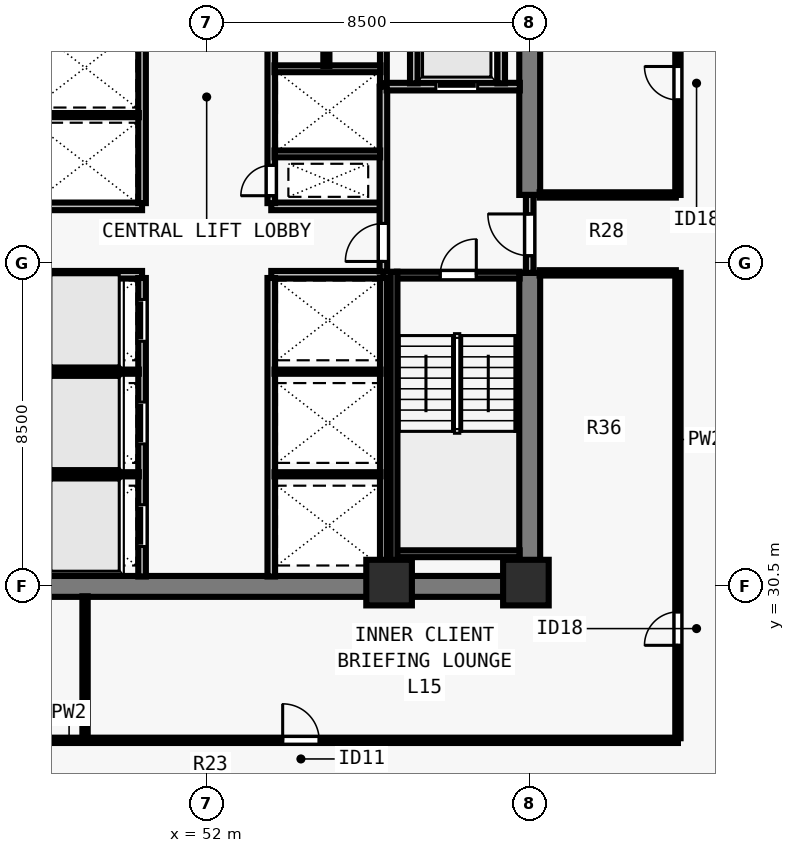
"""IFC4 building model, lengths in metres.
Left out: names, types, materials, properties, quantities, classifications, styles, units other than length and angle.
Written with IfcOpenShell. Run it as: python <this file> out.ifc"""

import sys

from ifc_helpers import new_model, si_unit, direction, frame, frame_2d, origin, origin_2d, place, context, subcontext, project, spatial, rectangle, extrude, element, fill, save


model = new_model("IFC4")
c1 = context("Model", 3, precision=1e-05, world=origin(), true_north=direction((0.0, 1.0)))
c2 = subcontext(c1, "Body", "Model", "MODEL_VIEW")
j1 = project(units=[si_unit("LENGTHUNIT", "METRE"), si_unit("PLANEANGLEUNIT", "RADIAN")], contexts=[c1])
p1 = place(None, origin())
s1 = spatial("IfcSite", under=j1, at=p1, CompositionType="ELEMENT")
p2 = place(p1, origin())
s2 = spatial("IfcBuilding", under=s1, at=p2, CompositionType="ELEMENT")
p3 = place(p2, frame((0.0, 0.0, 58.5)))
s3 = spatial("IfcBuildingStorey", under=s2, at=p3, CompositionType="ELEMENT", Elevation=58.5)
for number, where, z_axis, x_axis in (
    (1, (56.8, 30.6, 0.0), (0.0, 0.0, 1.0), (1.0, 0.0, 0.0)),
    (2, (60.4, 30.6, 0.0), (0.0, 0.0, 1.0), (1.0, 0.0, 0.0)),
):
    element("IfcColumn", number, at=place(p3, frame(where, z_axis=z_axis, x_axis=x_axis)), inside=s3, PredefinedType="COLUMN", context=c2, shape_type="SweptSolid", body=[
        extrude(rectangle(XDim=1.2, YDim=1.2, at=origin_2d()), origin(), (0.0, 0.0, 1.0), 3.5),
    ])
p4 = place(p3, frame((43.225, 30.5, 0.0), z_axis=(0.0, 0.0, 1.0), x_axis=(1.0, 0.0, 0.0)))
e3 = element("IfcWall", 3, at=p4, inside=s3, PredefinedType="SHEAR", context=c2, shape_type="SweptSolid", body=[
    extrude(rectangle(XDim=17.55, YDim=0.55, at=frame_2d((8.775, 0.0))), origin(), (0.0, 0.0, 1.0), 3.28),
])
p5 = place(p3, frame((60.5, 30.765, 0.0), z_axis=(0.0, 0.0, 1.0), x_axis=(0.0, 1.0, 0.0)))
e4 = element("IfcWall", 4, at=p5, inside=s3, PredefinedType="SHEAR", context=c2, shape_type="SweptSolid", body=[
    extrude(rectangle(XDim=7.985, YDim=0.55, at=frame_2d((3.993, 0.0))), origin(), (0.0, 0.0, 1.0), 3.28),
])
p6 = place(p3, frame((60.5, 40.8, 0.0), z_axis=(0.0, 0.0, 1.0), x_axis=(0.0, 1.0, 0.0)))
e5 = element("IfcWall", 5, at=p6, inside=s3, PredefinedType="SHEAR", context=c2, shape_type="SweptSolid", body=[
    extrude(rectangle(XDim=6.435, YDim=0.55, at=frame_2d((3.218, 0.0))), origin(), (0.0, 0.0, 1.0), 3.28),
])
for number, where, z_axis, x_axis in (
    (6, (47.35, 38.7, 0.0), (0.0, 0.0, 1.0), (1.0, 0.0, 0.0)),
    (7, (47.35, 40.5, 0.0), (0.0, 0.0, 1.0), (1.0, 0.0, 0.0)),
    (8, (53.7, 38.7, 0.0), (0.0, 0.0, 1.0), (1.0, 0.0, 0.0)),
    (9, (53.7, 40.5, 0.0), (0.0, 0.0, 1.0), (1.0, 0.0, 0.0)),
):
    element("IfcWall", number, at=place(p3, frame(where, z_axis=z_axis, x_axis=x_axis)), inside=s3, PredefinedType="SOLIDWALL", context=c2, shape_type="SweptSolid", body=[
        extrude(rectangle(XDim=2.95, YDim=0.2, at=frame_2d((1.475, 0.0))), origin(), (0.0, 0.0, 1.0), 3.28),
    ])
p7 = place(p3, frame((50.3, 30.76, 0.0), z_axis=(0.0, 0.0, 1.0), x_axis=(0.0, 1.0, 0.0)))
e10 = element("IfcWall", 10, at=p7, inside=s3, PredefinedType="SOLIDWALL", context=c2, shape_type="SweptSolid", body=[
    extrude(rectangle(XDim=7.855, YDim=0.2, at=frame_2d((3.927, 0.0))), origin(), (0.0, 0.0, 1.0), 3.28),
])
p8 = place(p7, frame((0.79, 0.0, 0.0)))
e11 = element("IfcOpeningElement", 11, at=p8, cuts=e10, PredefinedType="OPENING", context=c2, shape_type="SweptSolid", body=[
    extrude(rectangle(XDim=1.1, YDim=2.2, at=frame_2d((0.55, 1.1))), frame((0.0, 0.11, 0.0), z_axis=(0.0, -1.0, 0.0), x_axis=(1.0, 0.0, 0.0)), (0.0, 0.0, 1.0), 0.22),
])
p9 = place(p7, frame((3.49, 0.0, 0.0)))
e12 = element("IfcOpeningElement", 12, at=p9, cuts=e10, PredefinedType="OPENING", context=c2, shape_type="SweptSolid", body=[
    extrude(rectangle(XDim=1.1, YDim=2.2, at=frame_2d((0.55, 1.1))), frame((0.0, 0.11, 0.0), z_axis=(0.0, -1.0, 0.0), x_axis=(1.0, 0.0, 0.0)), (0.0, 0.0, 1.0), 0.22),
])
p10 = place(p7, frame((6.19, 0.0, 0.0)))
e13 = element("IfcOpeningElement", 13, at=p10, cuts=e10, PredefinedType="OPENING", context=c2, shape_type="SweptSolid", body=[
    extrude(rectangle(XDim=1.1, YDim=2.2, at=frame_2d((0.55, 1.1))), frame((0.0, 0.11, 0.0), z_axis=(0.0, -1.0, 0.0), x_axis=(1.0, 0.0, 0.0)), (0.0, 0.0, 1.0), 0.22),
])
p11 = place(p3, frame((53.7, 30.76, 0.0), z_axis=(0.0, 0.0, 1.0), x_axis=(0.0, 1.0, 0.0)))
e14 = element("IfcWall", 14, at=p11, inside=s3, PredefinedType="SOLIDWALL", context=c2, shape_type="SweptSolid", body=[
    extrude(rectangle(XDim=7.855, YDim=0.2, at=frame_2d((3.927, 0.0))), origin(), (0.0, 0.0, 1.0), 3.28),
])
p12 = place(p3, frame((50.3, 40.585, 0.0), z_axis=(0.0, 0.0, 1.0), x_axis=(0.0, 1.0, 0.0)))
e15 = element("IfcWall", 15, at=p12, inside=s3, PredefinedType="SOLIDWALL", context=c2, shape_type="SweptSolid", body=[
    extrude(rectangle(XDim=6.655, YDim=0.2, at=frame_2d((3.328, 0.0))), origin(), (0.0, 0.0, 1.0), 3.28),
])
p13 = place(p12, frame((5.065, 0.0, 0.0)))
e16 = element("IfcOpeningElement", 16, at=p13, cuts=e15, PredefinedType="OPENING", context=c2, shape_type="SweptSolid", body=[
    extrude(rectangle(XDim=0.8, YDim=2.08, at=frame_2d((0.4, 1.04))), frame((0.0, 0.11, 0.0), z_axis=(0.0, -1.0, 0.0), x_axis=(1.0, 0.0, 0.0)), (0.0, 0.0, 1.0), 0.22),
])
p14 = place(p3, frame((53.7, 40.585, 0.0), z_axis=(0.0, 0.0, 1.0), x_axis=(0.0, 1.0, 0.0)))
e17 = element("IfcWall", 17, at=p14, inside=s3, PredefinedType="SOLIDWALL", context=c2, shape_type="SweptSolid", body=[
    extrude(rectangle(XDim=6.655, YDim=0.2, at=frame_2d((3.328, 0.0))), origin(), (0.0, 0.0, 1.0), 3.28),
])
p15 = place(p14, frame((0.195, 0.0, 0.0)))
e18 = element("IfcOpeningElement", 18, at=p15, cuts=e17, PredefinedType="OPENING", context=c2, shape_type="SweptSolid", body=[
    extrude(rectangle(XDim=0.8, YDim=2.08, at=frame_2d((0.4, 1.04))), frame((0.0, 0.11, 0.0), z_axis=(0.0, -1.0, 0.0), x_axis=(1.0, 0.0, 0.0)), (0.0, 0.0, 1.0), 0.22),
])
p16 = place(p14, frame((4.265, 0.0, 0.0)))
e19 = element("IfcOpeningElement", 19, at=p16, cuts=e17, PredefinedType="OPENING", context=c2, shape_type="SweptSolid", body=[
    extrude(rectangle(XDim=0.95, YDim=2.12, at=frame_2d((0.475, 1.06))), frame((0.0, 0.11, 0.0), z_axis=(0.0, -1.0, 0.0), x_axis=(1.0, 0.0, 0.0)), (0.0, 0.0, 1.0), 0.22),
])
p17 = place(p3, frame((60.5, 38.75, 0.0), z_axis=(0.0, 0.0, 1.0), x_axis=(0.0, 1.0, 0.0)))
e20 = element("IfcWall", 20, at=p17, inside=s3, PredefinedType="SOLIDWALL", context=c2, shape_type="SweptSolid", body=[
    extrude(rectangle(XDim=2.05, YDim=0.2, at=frame_2d((1.025, 0.0))), origin(), (0.0, 0.0, 1.0), 3.28),
])
p18 = place(p17, frame((0.45, 0.0, 0.0)))
e21 = element("IfcOpeningElement", 21, at=p18, cuts=e20, PredefinedType="OPENING", context=c2, shape_type="SweptSolid", body=[
    extrude(rectangle(XDim=1.1, YDim=2.15, at=frame_2d((0.55, 1.075))), frame((0.0, 0.11, 0.0), z_axis=(0.0, -1.0, 0.0), x_axis=(1.0, 0.0, 0.0)), (0.0, 0.0, 1.0), 0.22),
])
p19 = place(p3, frame((56.65, 38.785, 0.0), z_axis=(0.0, 0.0, 1.0), x_axis=(0.0, 1.0, 0.0)))
e22 = element("IfcWall", 22, at=p19, inside=s3, PredefinedType="SOLIDWALL", context=c2, shape_type="SweptSolid", body=[
    extrude(rectangle(XDim=4.865, YDim=0.2, at=frame_2d((2.433, 0.0))), origin(), (0.0, 0.0, 1.0), 3.28),
])
p20 = place(p19, frame((0.265, 0.0, 0.0)))
e23 = element("IfcOpeningElement", 23, at=p20, cuts=e22, PredefinedType="OPENING", context=c2, shape_type="SweptSolid", body=[
    extrude(rectangle(XDim=1.0, YDim=2.15, at=frame_2d((0.5, 1.075))), frame((0.0, 0.11, 0.0), z_axis=(0.0, -1.0, 0.0), x_axis=(1.0, 0.0, 0.0)), (0.0, 0.0, 1.0), 0.22),
])
p21 = place(p3, frame((56.735, 43.65, 0.0), z_axis=(0.0, 0.0, 1.0), x_axis=(1.0, 0.0, 0.0)))
e24 = element("IfcWall", 24, at=p21, inside=s3, PredefinedType="SOLIDWALL", context=c2, shape_type="SweptSolid", body=[
    extrude(rectangle(XDim=3.505, YDim=0.2, at=frame_2d((1.752, 0.0))), origin(), (0.0, 0.0, 1.0), 3.28),
])
p22 = place(p21, frame((1.295, 0.0, 0.0)))
e25 = element("IfcOpeningElement", 25, at=p22, cuts=e24, PredefinedType="OPENING", context=c2, shape_type="SweptSolid", body=[
    extrude(rectangle(XDim=1.1, YDim=2.2, at=frame_2d((0.55, 1.1))), frame((0.0, 0.11, 0.0), z_axis=(0.0, -1.0, 0.0), x_axis=(1.0, 0.0, 0.0)), (0.0, 0.0, 1.0), 0.22),
])
for number, where, z_axis, x_axis in (
    (26, (57.45, 43.735, 0.0), (0.0, 0.0, 1.0), (0.0, 1.0, 0.0)),
    (27, (59.75, 43.735, 0.0), (0.0, 0.0, 1.0), (0.0, 1.0, 0.0)),
):
    element("IfcWall", number, at=place(p3, frame(where, z_axis=z_axis, x_axis=x_axis)), inside=s3, PredefinedType="SOLIDWALL", context=c2, shape_type="SweptSolid", body=[
        extrude(rectangle(XDim=3.505, YDim=0.2, at=frame_2d((1.752, 0.0))), origin(), (0.0, 0.0, 1.0), 3.28),
    ])
for number, where, z_axis, x_axis in (
    (28, (47.425, 33.45, 0.0), (0.0, 0.0, 1.0), (1.0, 0.0, 0.0)),
    (29, (47.425, 36.15, 0.0), (0.0, 0.0, 1.0), (1.0, 0.0, 0.0)),
):
    element("IfcWall", number, at=place(p3, frame(where, z_axis=z_axis, x_axis=x_axis)), inside=s3, PredefinedType="PARTITIONING", context=c2, shape_type="SweptSolid", body=[
        extrude(rectangle(XDim=2.79, YDim=0.11, at=frame_2d((1.395, 0.0))), origin(), (0.0, 0.0, 1.0), 3.28),
    ])
p23 = place(p3, frame((56.65, 30.76, 0.0), z_axis=(0.0, 0.0, 1.0), x_axis=(0.0, 1.0, 0.0)))
e30 = element("IfcWall", 30, at=p23, inside=s3, PredefinedType="SOLIDWALL", context=c2, shape_type="SweptSolid", body=[
    extrude(rectangle(XDim=7.855, YDim=0.18, at=frame_2d((3.927, 0.0))), origin(), (0.0, 0.0, 1.0), 3.28),
])
for number, where, z_axis, x_axis in (
    (31, (53.785, 33.45, 0.0), (0.0, 0.0, 1.0), (1.0, 0.0, 0.0)),
    (32, (53.785, 36.15, 0.0), (0.0, 0.0, 1.0), (1.0, 0.0, 0.0)),
):
    element("IfcWall", number, at=place(p3, frame(where, z_axis=z_axis, x_axis=x_axis)), inside=s3, PredefinedType="PARTITIONING", context=c2, shape_type="SweptSolid", body=[
        extrude(rectangle(XDim=2.79, YDim=0.11, at=frame_2d((1.395, 0.0))), origin(), (0.0, 0.0, 1.0), 3.28),
    ])
p24 = place(p3, frame((47.435, 42.9, 0.0), z_axis=(0.0, 0.0, 1.0), x_axis=(1.0, 0.0, 0.0)))
e33 = element("IfcWall", 33, at=p24, inside=s3, PredefinedType="PARTITIONING", context=c2, shape_type="SweptSolid", body=[
    extrude(rectangle(XDim=2.78, YDim=0.11, at=frame_2d((1.39, 0.0))), origin(), (0.0, 0.0, 1.0), 3.28),
])
p25 = place(p3, frame((56.65, 43.735, 0.0), z_axis=(0.0, 0.0, 1.0), x_axis=(0.0, 1.0, 0.0)))
e34 = element("IfcWall", 34, at=p25, inside=s3, PredefinedType="SOLIDWALL", context=c2, shape_type="SweptSolid", body=[
    extrude(rectangle(XDim=3.505, YDim=0.18, at=frame_2d((1.752, 0.0))), origin(), (0.0, 0.0, 1.0), 3.28),
])
p26 = place(p3, frame((53.785, 41.88, 0.0), z_axis=(0.0, 0.0, 1.0), x_axis=(1.0, 0.0, 0.0)))
e35 = element("IfcWall", 35, at=p26, inside=s3, PredefinedType="SOLIDWALL", context=c2, shape_type="SweptSolid", body=[
    extrude(rectangle(XDim=2.78, YDim=0.18, at=frame_2d((1.39, 0.0))), origin(), (0.0, 0.0, 1.0), 3.28),
])
p27 = place(p3, frame((53.785, 44.12, 0.0), z_axis=(0.0, 0.0, 1.0), x_axis=(1.0, 0.0, 0.0)))
e36 = element("IfcWall", 36, at=p27, inside=s3, PredefinedType="SOLIDWALL", context=c2, shape_type="SweptSolid", body=[
    extrude(rectangle(XDim=2.79, YDim=0.18, at=frame_2d((1.395, 0.0))), origin(), (0.0, 0.0, 1.0), 3.28),
])
p28 = place(p3, frame((55.15, 44.195, 0.0), z_axis=(0.0, 0.0, 1.0), x_axis=(0.0, 1.0, 0.0)))
e37 = element("IfcWall", 37, at=p28, inside=s3, PredefinedType="PARTITIONING", context=c2, shape_type="SweptSolid", body=[
    extrude(rectangle(XDim=3.045, YDim=0.16, at=frame_2d((1.522, 0.0))), origin(), (0.0, 0.0, 1.0), 3.28),
])
p29 = place(p28, frame((1.025, 0.0, 0.0)))
e38 = element("IfcOpeningElement", 38, at=p29, cuts=e37, PredefinedType="OPENING", context=c2, shape_type="SweptSolid", body=[
    extrude(rectangle(XDim=0.8, YDim=2.1, at=frame_2d((0.4, 1.05))), frame((0.0, 0.09, 0.0), z_axis=(0.0, -1.0, 0.0), x_axis=(1.0, 0.0, 0.0)), (0.0, 0.0, 1.0), 0.18),
])
p30 = place(p3, frame((39.6, 26.45, 0.0), z_axis=(0.0, 0.0, 1.0), x_axis=(1.0, 0.0, 0.0)))
e39 = element("IfcWall", 39, at=p30, inside=s3, PredefinedType="PARTITIONING", context=c2, shape_type="SweptSolid", body=[
    extrude(rectangle(XDim=24.8, YDim=0.14, at=frame_2d((12.4, 0.0))), origin(), (0.0, 0.0, 1.0), 3.28),
])
p31 = place(p30, frame((2.2, 0.0, 0.0)))
e40 = element("IfcOpeningElement", 40, at=p31, cuts=e39, PredefinedType="OPENING", context=c2, shape_type="SweptSolid", body=[
    extrude(rectangle(XDim=0.96, YDim=2.12, at=frame_2d((0.48, 1.06))), frame((0.0, 0.08, 0.0), z_axis=(0.0, -1.0, 0.0), x_axis=(1.0, 0.0, 0.0)), (0.0, 0.0, 1.0), 0.16),
])
p32 = place(p30, frame((14.4, 0.0, 0.0)))
e41 = element("IfcOpeningElement", 41, at=p32, cuts=e39, PredefinedType="OPENING", context=c2, shape_type="SweptSolid", body=[
    extrude(rectangle(XDim=0.96, YDim=2.12, at=frame_2d((0.48, 1.06))), frame((0.0, 0.08, 0.0), z_axis=(0.0, -1.0, 0.0), x_axis=(1.0, 0.0, 0.0)), (0.0, 0.0, 1.0), 0.16),
])
p33 = place(p3, frame((64.4, 26.505, 0.0), z_axis=(0.0, 0.0, 1.0), x_axis=(0.0, 1.0, 0.0)))
e42 = element("IfcWall", 42, at=p33, inside=s3, PredefinedType="PARTITIONING", context=c2, shape_type="SweptSolid", body=[
    extrude(rectangle(XDim=12.245, YDim=0.14, at=frame_2d((6.123, 0.0))), origin(), (0.0, 0.0, 1.0), 3.28),
])
p34 = place(p33, frame((2.445, 0.0, 0.0)))
e43 = element("IfcOpeningElement", 43, at=p34, cuts=e42, PredefinedType="OPENING", context=c2, shape_type="SweptSolid", body=[
    extrude(rectangle(XDim=0.88, YDim=2.1, at=frame_2d((0.44, 1.05))), frame((0.0, 0.08, 0.0), z_axis=(0.0, -1.0, 0.0), x_axis=(1.0, 0.0, 0.0)), (0.0, 0.0, 1.0), 0.16),
])
p35 = place(p3, frame((64.4, 40.8, 0.0), z_axis=(0.0, 0.0, 1.0), x_axis=(0.0, 1.0, 0.0)))
e44 = element("IfcWall", 44, at=p35, inside=s3, PredefinedType="PARTITIONING", context=c2, shape_type="SweptSolid", body=[
    extrude(rectangle(XDim=10.695, YDim=0.14, at=frame_2d((5.348, 0.0))), origin(), (0.0, 0.0, 1.0), 3.28),
])
p36 = place(p35, frame((2.5, 0.0, 0.0)))
e45 = element("IfcOpeningElement", 45, at=p36, cuts=e44, PredefinedType="OPENING", context=c2, shape_type="SweptSolid", body=[
    extrude(rectangle(XDim=0.88, YDim=2.1, at=frame_2d((0.44, 1.05))), frame((0.0, 0.08, 0.0), z_axis=(0.0, -1.0, 0.0), x_axis=(1.0, 0.0, 0.0)), (0.0, 0.0, 1.0), 0.16),
])
for number, where, z_axis, x_axis in (
    (46, (60.76, 38.75, 0.0), (0.0, 0.0, 1.0), (1.0, 0.0, 0.0)),
    (47, (60.76, 40.8, 0.0), (0.0, 0.0, 1.0), (1.0, 0.0, 0.0)),
):
    element("IfcWall", number, at=place(p3, frame(where, z_axis=z_axis, x_axis=x_axis)), inside=s3, PredefinedType="PARTITIONING", context=c2, shape_type="SweptSolid", body=[
        extrude(rectangle(XDim=3.585, YDim=0.14, at=frame_2d((1.792, 0.0))), origin(), (0.0, 0.0, 1.0), 3.28),
    ])
p37 = place(p3, frame((48.8, 26.505, 0.0), z_axis=(0.0, 0.0, 1.0), x_axis=(0.0, 1.0, 0.0)))
e48 = element("IfcWall", 48, at=p37, inside=s3, PredefinedType="PARTITIONING", context=c2, shape_type="SweptSolid", body=[
    extrude(rectangle(XDim=3.735, YDim=0.14, at=frame_2d((1.868, 0.0))), origin(), (0.0, 0.0, 1.0), 3.28),
])
p38 = place(p3, frame((57.005, 38.69, 0.0), z_axis=(0.0, 0.0, 1.0), x_axis=(1.0, 0.0, 0.0)))
e49 = element("IfcWall", 49, at=p38, inside=s3, PredefinedType="SOLIDWALL", context=c2, shape_type="SweptSolid", body=[
    extrude(rectangle(XDim=3.23, YDim=0.18, at=frame_2d((1.615, 0.0))), origin(), (0.0, 0.0, 1.0), 3.28),
])
p39 = place(p38, frame((1.14, 0.0, 0.0)))
e50 = element("IfcOpeningElement", 50, at=p39, cuts=e49, PredefinedType="OPENING", context=c2, shape_type="SweptSolid", body=[
    extrude(rectangle(XDim=0.95, YDim=2.15, at=frame_2d((0.475, 1.075))), frame((0.0, 0.1, 0.0), z_axis=(0.0, -1.0, 0.0), x_axis=(1.0, 0.0, 0.0)), (0.0, 0.0, 1.0), 0.2),
])
p40 = place(p3, frame((57.005, 31.36, 0.0), z_axis=(0.0, 0.0, 1.0), x_axis=(1.0, 0.0, 0.0)))
e51 = element("IfcWall", 51, at=p40, inside=s3, PredefinedType="SOLIDWALL", context=c2, shape_type="SweptSolid", body=[
    extrude(rectangle(XDim=3.23, YDim=0.18, at=frame_2d((1.615, 0.0))), origin(), (0.0, 0.0, 1.0), 3.28),
])
p41 = place(p3, frame((56.93, 38.78, 0.0), z_axis=(0.0, 0.0, 1.0), x_axis=(0.0, -1.0, 0.0)))
e52 = element("IfcWall", 52, at=p41, inside=s3, PredefinedType="SOLIDWALL", context=c2, shape_type="SweptSolid", body=[
    extrude(rectangle(XDim=8.017, YDim=0.18, at=frame_2d((4.009, 0.0))), origin(), (0.0, 0.0, 1.0), 3.28),
])
p42 = place(p18, origin())
e53 = element("IfcDoor", 53, at=p42, inside=s3, OperationType="SINGLE_SWING_RIGHT", PredefinedType="DOOR", context=c2, shape_type="SweptSolid", body=[
    extrude(rectangle(XDim=1.1, YDim=2.15, at=frame_2d((0.55, 1.075))), frame((0.0, 0.025, 0.0), z_axis=(0.0, -1.0, 0.0), x_axis=(1.0, 0.0, 0.0)), (0.0, 0.0, 1.0), 0.05),
])
fill(e21, e53)
p43 = place(p20, origin())
e54 = element("IfcDoor", 54, at=p43, inside=s3, OperationType="SINGLE_SWING_LEFT", PredefinedType="DOOR", context=c2, shape_type="SweptSolid", body=[
    extrude(rectangle(XDim=1.0, YDim=2.15, at=frame_2d((0.5, 1.075))), frame((0.0, 0.025, 0.0), z_axis=(0.0, -1.0, 0.0), x_axis=(1.0, 0.0, 0.0)), (0.0, 0.0, 1.0), 0.05),
])
fill(e23, e54)
p44 = place(p22, origin())
e55 = element("IfcDoor", 55, at=p44, inside=s3, OperationType="SLIDING_TO_LEFT", PredefinedType="DOOR", context=c2, shape_type="SweptSolid", body=[
    extrude(rectangle(XDim=1.1, YDim=2.2, at=frame_2d((0.55, 1.1))), frame((0.0, 0.025, 0.0), z_axis=(0.0, -1.0, 0.0), x_axis=(1.0, 0.0, 0.0)), (0.0, 0.0, 1.0), 0.05),
])
fill(e25, e55)
p45 = place(p8, origin())
e56 = element("IfcDoor", 56, at=p45, inside=s3, OperationType="SLIDING_TO_LEFT", PredefinedType="DOOR", context=c2, shape_type="SweptSolid", body=[
    extrude(rectangle(XDim=1.1, YDim=2.2, at=frame_2d((0.55, 1.1))), frame((0.0, 0.025, 0.0), z_axis=(0.0, -1.0, 0.0), x_axis=(1.0, 0.0, 0.0)), (0.0, 0.0, 1.0), 0.05),
])
fill(e11, e56)
p46 = place(p9, origin())
e57 = element("IfcDoor", 57, at=p46, inside=s3, OperationType="SLIDING_TO_LEFT", PredefinedType="DOOR", context=c2, shape_type="SweptSolid", body=[
    extrude(rectangle(XDim=1.1, YDim=2.2, at=frame_2d((0.55, 1.1))), frame((0.0, 0.025, 0.0), z_axis=(0.0, -1.0, 0.0), x_axis=(1.0, 0.0, 0.0)), (0.0, 0.0, 1.0), 0.05),
])
fill(e12, e57)
p47 = place(p10, origin())
e58 = element("IfcDoor", 58, at=p47, inside=s3, OperationType="SLIDING_TO_LEFT", PredefinedType="DOOR", context=c2, shape_type="SweptSolid", body=[
    extrude(rectangle(XDim=1.1, YDim=2.2, at=frame_2d((0.55, 1.1))), frame((0.0, 0.025, 0.0), z_axis=(0.0, -1.0, 0.0), x_axis=(1.0, 0.0, 0.0)), (0.0, 0.0, 1.0), 0.05),
])
fill(e13, e58)
p48 = place(p15, origin())
e59 = element("IfcDoor", 59, at=p48, inside=s3, OperationType="SINGLE_SWING_LEFT", PredefinedType="DOOR", context=c2, shape_type="SweptSolid", body=[
    extrude(rectangle(XDim=0.8, YDim=2.08, at=frame_2d((0.4, 1.04))), frame((0.0, 0.025, 0.0), z_axis=(0.0, -1.0, 0.0), x_axis=(1.0, 0.0, 0.0)), (0.0, 0.0, 1.0), 0.05),
])
fill(e18, e59)
p49 = place(p32, origin())
e60 = element("IfcDoor", 60, at=p49, inside=s3, OperationType="SINGLE_SWING_LEFT", PredefinedType="DOOR", context=c2, shape_type="SweptSolid", body=[
    extrude(rectangle(XDim=0.96, YDim=2.12, at=frame_2d((0.48, 1.06))), frame((0.0, 0.025, 0.0), z_axis=(0.0, -1.0, 0.0), x_axis=(1.0, 0.0, 0.0)), (0.0, 0.0, 1.0), 0.05),
])
fill(e41, e60)
p50 = place(p34, origin())
e61 = element("IfcDoor", 61, at=p50, inside=s3, OperationType="SINGLE_SWING_LEFT", PredefinedType="DOOR", context=c2, shape_type="SweptSolid", body=[
    extrude(rectangle(XDim=0.88, YDim=2.1, at=frame_2d((0.44, 1.05))), frame((0.0, 0.025, 0.0), z_axis=(0.0, -1.0, 0.0), x_axis=(1.0, 0.0, 0.0)), (0.0, 0.0, 1.0), 0.05),
])
fill(e43, e61)
p51 = place(p36, origin())
e62 = element("IfcDoor", 62, at=p51, inside=s3, OperationType="SINGLE_SWING_RIGHT", PredefinedType="DOOR", context=c2, shape_type="SweptSolid", body=[
    extrude(rectangle(XDim=0.88, YDim=2.1, at=frame_2d((0.44, 1.05))), frame((0.0, 0.025, 0.0), z_axis=(0.0, -1.0, 0.0), x_axis=(1.0, 0.0, 0.0)), (0.0, 0.0, 1.0), 0.05),
])
fill(e45, e62)
p52 = place(p39, origin())
e63 = element("IfcDoor", 63, at=p52, inside=s3, OperationType="SINGLE_SWING_RIGHT", PredefinedType="DOOR", context=c2, shape_type="SweptSolid", body=[
    extrude(rectangle(XDim=0.95, YDim=2.15, at=frame_2d((0.475, 1.075))), frame((0.0, 0.025, 0.0), z_axis=(0.0, -1.0, 0.0), x_axis=(1.0, 0.0, 0.0)), (0.0, 0.0, 1.0), 0.05),
])
fill(e50, e63)
save(model, sys.argv[1])
